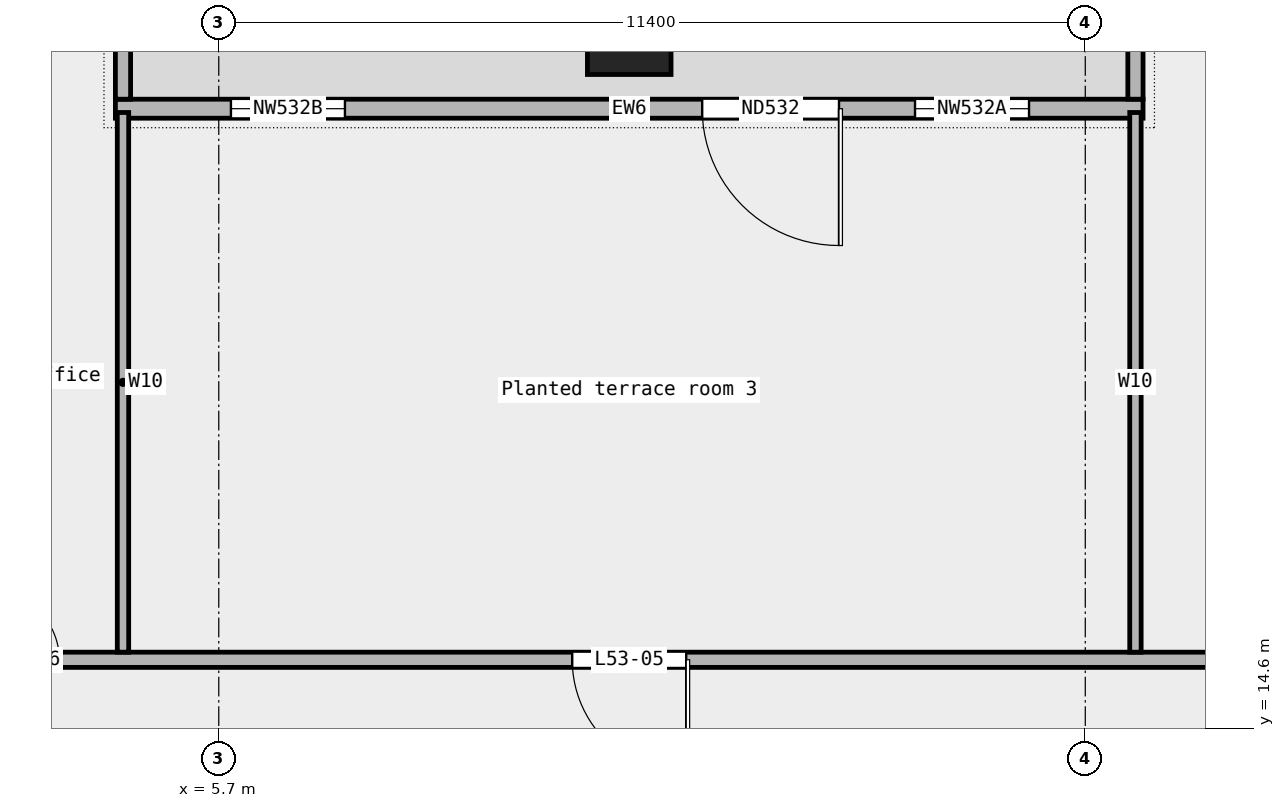
"""IFC4 building model, lengths in metres.
Left out: names, types, materials, properties, quantities, classifications, styles, units other than length and angle.
Written with IfcOpenShell. Run it as: python <this file> out.ifc"""

import sys

from ifc_helpers import new_model, si_unit, direction, frame, frame_2d, origin, origin_2d, place, context, subcontext, project, spatial, rectangle, extrude, element, fill, save


model = new_model("IFC4")
c1 = context("Model", 3, precision=1e-05, world=origin(), true_north=direction((0.0, 1.0)))
c2 = subcontext(c1, "Body", "Model", "MODEL_VIEW")
j1 = project(units=[si_unit("LENGTHUNIT", "METRE"), si_unit("PLANEANGLEUNIT", "RADIAN")], contexts=[c1])
p1 = place(None, origin())
s1 = spatial("IfcSite", under=j1, at=p1, CompositionType="ELEMENT")
p2 = place(p1, origin())
s2 = spatial("IfcBuilding", under=s1, at=p2, CompositionType="ELEMENT")
p3 = place(p2, frame((0.0, 0.0, 247.0)))
s3 = spatial("IfcBuildingStorey", under=s2, at=p3, CompositionType="ELEMENT", Elevation=247.0)
p4 = place(p3, frame((11.1, 23.75, 0.0), z_axis=(0.0, 0.0, 1.0), x_axis=(1.0, 0.0, 0.0)))
e1 = element("IfcColumn", 1, at=p4, inside=s3, PredefinedType="COLUMN", context=c2, shape_type="SweptSolid", body=[
    extrude(rectangle(XDim=1.1, YDim=1.1, at=origin_2d()), origin(), (0.0, 0.0, 1.0), 3.6),
])
p5 = place(p3, frame((17.86, 22.75, 0.0), z_axis=(0.0, 0.0, 1.0), x_axis=(-1.0, 0.0, 0.0)))
e2 = element("IfcWall", 2, at=p5, inside=s3, PredefinedType="STANDARD", context=c2, shape_type="SweptSolid", body=[
    extrude(rectangle(XDim=13.52, YDim=0.25, at=frame_2d((6.76, 0.0))), origin(), (0.0, 0.0, 1.0), 3.6),
])
p6 = place(p5, frame((1.5, 0.0, 0.45)))
e3 = element("IfcOpeningElement", 3, at=p6, cuts=e2, PredefinedType="OPENING", context=c2, shape_type="SweptSolid", body=[
    extrude(rectangle(XDim=1.5, YDim=2.4, at=frame_2d((0.75, 1.2))), frame((0.0, 0.137, 0.0), z_axis=(0.0, -1.0, 0.0), x_axis=(1.0, 0.0, 0.0)), (0.0, 0.0, 1.0), 0.274),
])
p7 = place(p5, frame((4.0, 0.0, 0.0)))
e4 = element("IfcOpeningElement", 4, at=p7, cuts=e2, PredefinedType="OPENING", context=c2, shape_type="SweptSolid", body=[
    extrude(rectangle(XDim=1.8, YDim=2.4, at=frame_2d((0.9, 1.2))), frame((0.0, 0.137, 0.0), z_axis=(0.0, -1.0, 0.0), x_axis=(1.0, 0.0, 0.0)), (0.0, 0.0, 1.0), 0.274),
])
p8 = place(p5, frame((10.5, 0.0, 0.45)))
e5 = element("IfcOpeningElement", 5, at=p8, cuts=e2, PredefinedType="OPENING", context=c2, shape_type="SweptSolid", body=[
    extrude(rectangle(XDim=1.5, YDim=2.4, at=frame_2d((0.75, 1.2))), frame((0.0, 0.137, 0.0), z_axis=(0.0, -1.0, 0.0), x_axis=(1.0, 0.0, 0.0)), (0.0, 0.0, 1.0), 0.274),
])
for number, where, z_axis, x_axis in (
    (6, (17.76, 24.75, 0.0), (0.0, 0.0, 1.0), (0.0, -1.0, 0.0)),
    (7, (4.44, 24.75, 0.0), (0.0, 0.0, 1.0), (0.0, -1.0, 0.0)),
):
    element("IfcWall", number, at=place(p3, frame(where, z_axis=z_axis, x_axis=x_axis)), inside=s3, PredefinedType="STANDARD", context=c2, shape_type="SweptSolid", body=[
        extrude(rectangle(XDim=1.875, YDim=0.2, at=frame_2d((0.938, 0.0))), origin(), (0.0, 0.0, 1.0), 3.6),
    ])
p9 = place(p3, frame((-28.15, 15.5, 0.0), z_axis=(0.0, 0.0, 1.0), x_axis=(1.0, 0.0, 0.0)))
e8 = element("IfcWall", 8, at=p9, inside=s3, PredefinedType="PARTITIONING", context=c2, shape_type="SweptSolid", body=[
    extrude(rectangle(XDim=56.3, YDim=0.2, at=frame_2d((28.15, 0.0))), origin(), (0.0, 0.0, 1.0), 3.6),
])
p10 = place(p9, frame((50.405, 0.0, 0.0)))
e9 = element("IfcOpeningElement", 9, at=p10, cuts=e8, PredefinedType="OPENING", context=c2, shape_type="SweptSolid", body=[
    extrude(rectangle(XDim=1.2, YDim=2.1, at=frame_2d((0.6, 1.05))), frame((0.0, 0.112, 0.0), z_axis=(0.0, -1.0, 0.0), x_axis=(1.0, 0.0, 0.0)), (0.0, 0.0, 1.0), 0.224),
])
p11 = place(p9, frame((38.5, 0.0, 0.0)))
e10 = element("IfcOpeningElement", 10, at=p11, cuts=e8, PredefinedType="OPENING", context=c2, shape_type="SweptSolid", body=[
    extrude(rectangle(XDim=1.5, YDim=2.1, at=frame_2d((0.75, 1.05))), frame((0.0, 0.112, 0.0), z_axis=(0.0, -1.0, 0.0), x_axis=(1.0, 0.0, 0.0)), (0.0, 0.0, 1.0), 0.224),
])
p12 = place(p9, frame((30.853, 0.0, 0.0)))
e11 = element("IfcOpeningElement", 11, at=p12, cuts=e8, PredefinedType="OPENING", context=c2, shape_type="SweptSolid", body=[
    extrude(rectangle(XDim=0.9, YDim=2.1, at=frame_2d((0.45, 1.05))), frame((0.0, 0.112, 0.0), z_axis=(0.0, -1.0, 0.0), x_axis=(1.0, 0.0, 0.0)), (0.0, 0.0, 1.0), 0.224),
])
p13 = place(p9, frame((19.798, 0.0, 0.0)))
e12 = element("IfcOpeningElement", 12, at=p13, cuts=e8, PredefinedType="OPENING", context=c2, shape_type="SweptSolid", body=[
    extrude(rectangle(XDim=1.8, YDim=2.1, at=frame_2d((0.9, 1.05))), frame((0.0, 0.112, 0.0), z_axis=(0.0, -1.0, 0.0), x_axis=(1.0, 0.0, 0.0)), (0.0, 0.0, 1.0), 0.224),
])
p14 = place(p9, frame((5.04, 0.0, 0.0)))
e13 = element("IfcOpeningElement", 13, at=p14, cuts=e8, PredefinedType="OPENING", context=c2, shape_type="SweptSolid", body=[
    extrude(rectangle(XDim=1.5, YDim=2.1, at=frame_2d((0.75, 1.05))), frame((0.0, 0.112, 0.0), z_axis=(0.0, -1.0, 0.0), x_axis=(1.0, 0.0, 0.0)), (0.0, 0.0, 1.0), 0.224),
])
for number, where, z_axis, x_axis in (
    (14, (4.44, 15.6, 0.0), (0.0, 0.0, 1.0), (0.0, 1.0, 0.0)),
    (15, (17.76, 15.6, 0.0), (0.0, 0.0, 1.0), (0.0, 1.0, 0.0)),
):
    element("IfcWall", number, at=place(p3, frame(where, z_axis=z_axis, x_axis=x_axis)), inside=s3, PredefinedType="PARTITIONING", context=c2, shape_type="SweptSolid", body=[
        extrude(rectangle(XDim=7.1, YDim=0.15, at=frame_2d((3.55, 0.0))), origin(), (0.0, 0.0, 1.0), 3.6),
    ])
p15 = place(p6, origin())
e16 = element("IfcWindow", 16, at=p15, inside=s3, PartitioningType="SINGLE_PANEL", PredefinedType="WINDOW", context=c2, shape_type="SweptSolid", body=[
    extrude(rectangle(XDim=1.5, YDim=2.4, at=frame_2d((0.75, 1.2))), frame((0.0, 0.03, 0.0), z_axis=(0.0, -1.0, 0.0), x_axis=(1.0, 0.0, 0.0)), (0.0, 0.0, 1.0), 0.06),
])
fill(e3, e16)
p16 = place(p7, origin())
e17 = element("IfcDoor", 17, at=p16, inside=s3, OperationType="DOUBLE_DOOR_SINGLE_SWING", PredefinedType="DOOR", context=c2, shape_type="SweptSolid", body=[
    extrude(rectangle(XDim=1.8, YDim=2.4, at=frame_2d((0.9, 1.2))), frame((0.0, 0.025, 0.0), z_axis=(0.0, -1.0, 0.0), x_axis=(1.0, 0.0, 0.0)), (0.0, 0.0, 1.0), 0.05),
])
fill(e4, e17)
p17 = place(p8, origin())
e18 = element("IfcWindow", 18, at=p17, inside=s3, PartitioningType="SINGLE_PANEL", PredefinedType="WINDOW", context=c2, shape_type="SweptSolid", body=[
    extrude(rectangle(XDim=1.5, YDim=2.4, at=frame_2d((0.75, 1.2))), frame((0.0, 0.03, 0.0), z_axis=(0.0, -1.0, 0.0), x_axis=(1.0, 0.0, 0.0)), (0.0, 0.0, 1.0), 0.06),
])
fill(e5, e18)
p18 = place(p11, origin())
e19 = element("IfcDoor", 19, at=p18, inside=s3, OperationType="DOUBLE_DOOR_SINGLE_SWING", PredefinedType="DOOR", context=c2, shape_type="SweptSolid", body=[
    extrude(rectangle(XDim=1.5, YDim=2.1, at=frame_2d((0.75, 1.05))), frame((0.0, 0.025, 0.0), z_axis=(0.0, -1.0, 0.0), x_axis=(1.0, 0.0, 0.0)), (0.0, 0.0, 1.0), 0.05),
])
fill(e10, e19)
p19 = place(p12, origin())
e20 = element("IfcDoor", 20, at=p19, inside=s3, OperationType="SINGLE_SWING_LEFT", PredefinedType="DOOR", context=c2, shape_type="SweptSolid", body=[
    extrude(rectangle(XDim=0.9, YDim=2.1, at=frame_2d((0.45, 1.05))), frame((0.0, 0.025, 0.0), z_axis=(0.0, -1.0, 0.0), x_axis=(1.0, 0.0, 0.0)), (0.0, 0.0, 1.0), 0.05),
])
fill(e11, e20)
save(model, sys.argv[1])
